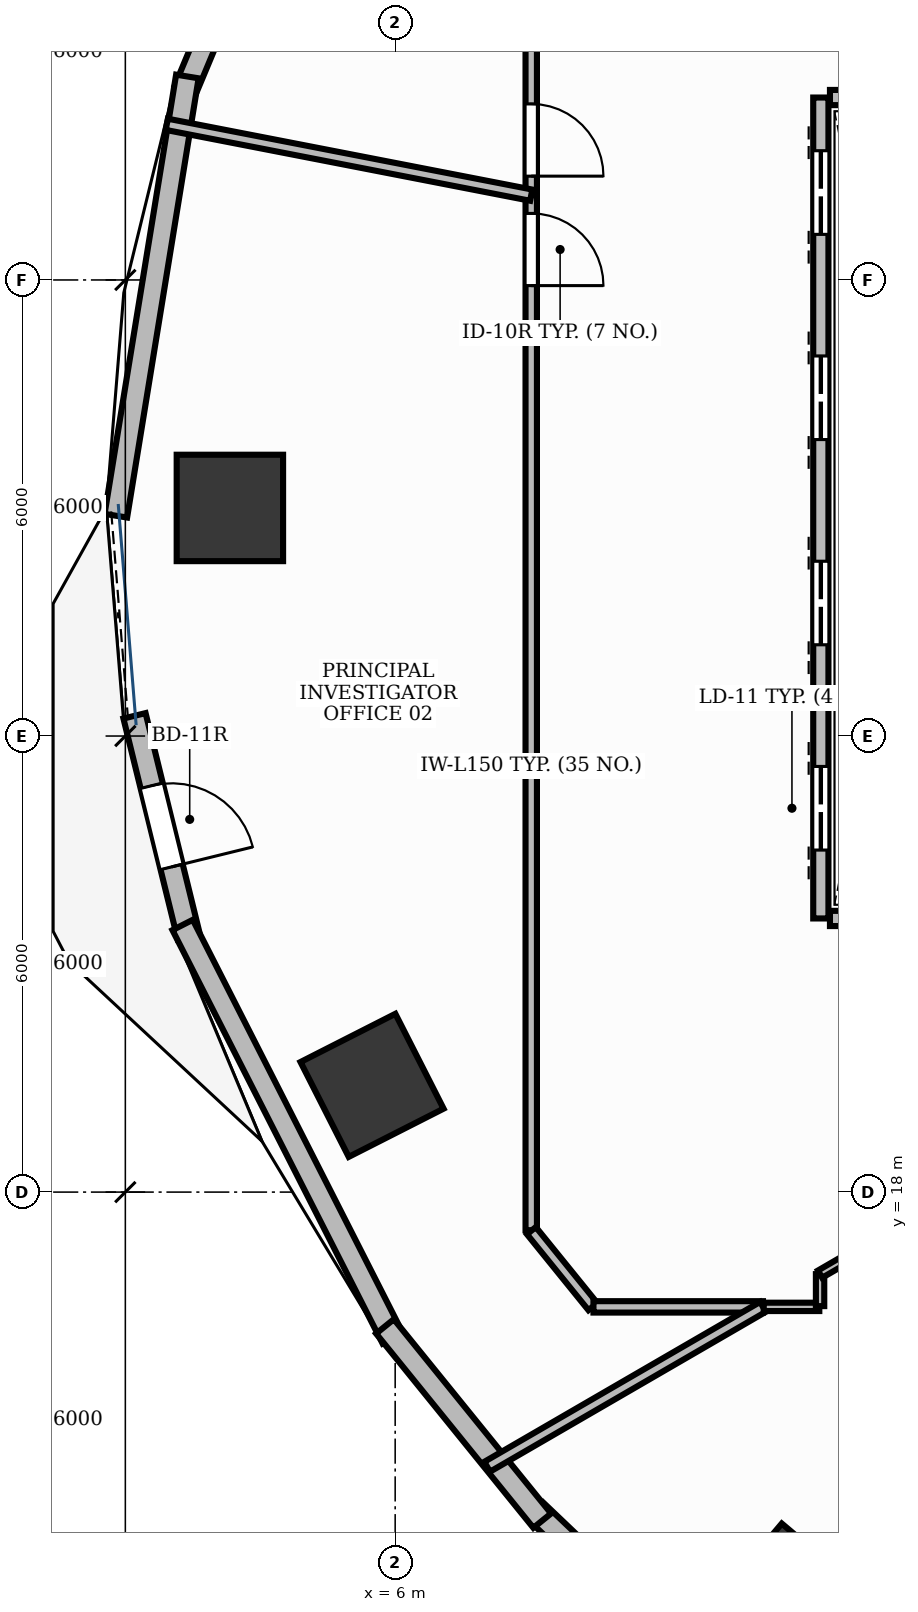
"""IFC4 building model, lengths in metres.
Left out: names, types, materials, properties, quantities, classifications, styles, units other than length and angle.
Written with IfcOpenShell. Run it as: python <this file> out.ifc"""

import sys

from ifc_helpers import new_model, si_unit, direction, frame, frame_2d, origin, origin_2d, place, context, subcontext, project, spatial, rectangle, extrude, element, fill, save


model = new_model("IFC4")
c1 = context("Model", 3, precision=1e-05, world=origin(), true_north=direction((0.0, 1.0)))
c2 = subcontext(c1, "Body", "Model", "MODEL_VIEW")
j1 = project(units=[si_unit("LENGTHUNIT", "METRE"), si_unit("PLANEANGLEUNIT", "RADIAN")], contexts=[c1])
p1 = place(None, origin())
s1 = spatial("IfcSite", under=j1, at=p1, CompositionType="ELEMENT")
p2 = place(p1, origin())
s2 = spatial("IfcBuilding", under=s1, at=p2, CompositionType="ELEMENT")
p3 = place(p2, frame((0.0, 0.0, 72.0)))
s3 = spatial("IfcBuildingStorey", under=s2, at=p3, CompositionType="ELEMENT", Elevation=72.0)
for number, where, z_axis, x_axis in (
    (1, (3.825, 27.001, -0.0), (0.0, 0.0, 1.0), (0.0, 1.0, 0.0)),
    (2, (5.696, 19.404, -0.0), (0.0, 0.0, 1.0), (-0.453, 0.891, 0.0)),
    (3, (11.17, 12.653, -0.0), (0.0, 0.0, 1.0), (-0.764, 0.645, 0.0)),
):
    element("IfcColumn", number, at=place(p3, frame(where, z_axis=z_axis, x_axis=x_axis)), inside=s3, PredefinedType="COLUMN", context=c2, shape_type="SweptSolid", body=[
        extrude(rectangle(XDim=1.4, YDim=1.4, at=origin_2d()), origin(), (0.0, 0.0, 1.0), 3.901),
    ])
p4 = place(p3, frame((4.417, 35.323, 0.0), z_axis=(0.0, 0.0, 1.0), x_axis=(-0.385358473275, -0.92276695166, 0.0)))
e4 = element("IfcWall", 4, at=p4, inside=s3, PredefinedType="STANDARD", context=c2, shape_type="SweptSolid", body=[
    extrude(rectangle(XDim=3.056, YDim=0.3, at=frame_2d((1.528, 0.0))), origin(), (0.0, 0.0, 1.0), 3.47),
])
p5 = place(p4, frame((0.778, 0.0, 0.95)))
e5 = element("IfcOpeningElement", 5, at=p5, cuts=e4, PredefinedType="OPENING", context=c2, shape_type="SweptSolid", body=[
    extrude(rectangle(XDim=1.5, YDim=1.8, at=frame_2d((0.75, 0.9))), frame((0.0, 0.165, 0.0), z_axis=(0.0, -1.0, 0.0), x_axis=(1.0, 0.0, 0.0)), (0.0, 0.0, 1.0), 0.33),
])
p6 = place(p3, frame((2.571, 24.266, 0.0), z_axis=(0.0, 0.0, 1.0), x_axis=(0.238522035896, -0.971137085273, 0.0)))
e6 = element("IfcWall", 6, at=p6, inside=s3, PredefinedType="STANDARD", context=c2, shape_type="SweptSolid", body=[
    extrude(rectangle(XDim=2.993, YDim=0.3, at=frame_2d((1.497, 0.0))), origin(), (0.0, 0.0, 1.0), 3.9),
])
p7 = place(p6, frame((0.946, 0.0, 0.0)))
e7 = element("IfcOpeningElement", 7, at=p7, cuts=e6, PredefinedType="OPENING", context=c2, shape_type="SweptSolid", body=[
    extrude(rectangle(XDim=1.1, YDim=2.15, at=frame_2d((0.55, 1.075))), frame((0.0, 0.165, 0.0), z_axis=(0.0, -1.0, 0.0), x_axis=(1.0, 0.0, 0.0)), (0.0, 0.0, 1.0), 0.33),
])
p8 = place(p3, frame((7.842, 13.809, 0.0), z_axis=(0.0, 0.0, 1.0), x_axis=(0.723678516117, -0.690137236578, 0.0)))
e8 = element("IfcWall", 8, at=p8, inside=s3, PredefinedType="STANDARD", context=c2, shape_type="SweptSolid", body=[
    extrude(rectangle(XDim=3.363, YDim=0.3, at=frame_2d((1.681, 0.0))), origin(), (0.0, 0.0, 1.0), 3.9),
])
p9 = place(p8, frame((0.931, 0.0, 0.95)))
e9 = element("IfcOpeningElement", 9, at=p9, cuts=e8, PredefinedType="OPENING", context=c2, shape_type="SweptSolid", body=[
    extrude(rectangle(XDim=1.5, YDim=1.8, at=frame_2d((0.75, 0.9))), frame((0.0, 0.165, 0.0), z_axis=(0.0, -1.0, 0.0), x_axis=(1.0, 0.0, 0.0)), (0.0, 0.0, 1.0), 0.33),
])
p10 = place(p3, frame((3.266, 32.677, 0.0), z_axis=(0.0, 0.0, 1.0), x_axis=(-0.160712446639, -0.987001271273, 0.0)))
e10 = element("IfcWall", 10, at=p10, inside=s3, PredefinedType="STANDARD", context=c2, shape_type="SweptSolid", body=[
    extrude(rectangle(XDim=5.855, YDim=0.3, at=frame_2d((2.927, 0.0))), origin(), (0.0, 0.0, 1.0), 3.47),
])
p11 = place(p3, frame((3.204, 21.514, 0.0), z_axis=(0.0, 0.0, 1.0), x_axis=(0.453093111502, -0.891463197395, 0.0)))
e11 = element("IfcWall", 11, at=p11, inside=s3, PredefinedType="STANDARD", context=c2, shape_type="SweptSolid", body=[
    extrude(rectangle(XDim=6.102, YDim=0.3, at=frame_2d((3.051, 0.0))), origin(), (0.0, 0.0, 1.0), 3.9),
])
p12 = place(p3, frame((5.866, 16.233, 0.0), z_axis=(0.0, 0.0, 1.0), x_axis=(0.629221727718, -0.777225847079, 0.0)))
e12 = element("IfcWall", 12, at=p12, inside=s3, PredefinedType="STANDARD", context=c2, shape_type="SweptSolid", body=[
    extrude(rectangle(XDim=3.288, YDim=0.3, at=frame_2d((1.644, 0.0))), origin(), (0.0, 0.0, 1.0), 3.9),
])
p13 = place(p3, frame((11.6, 21.6, 0.0), z_axis=(0.0, 0.0, 1.0), x_axis=(0.0, 1.0, 0.0)))
e13 = element("IfcWall", 13, at=p13, inside=s3, PredefinedType="PARTITIONING", context=c2, shape_type="SweptSolid", body=[
    extrude(rectangle(XDim=10.8, YDim=0.2, at=frame_2d((5.4, 0.0))), origin(), (0.0, 0.0, 1.0), 2.91),
])
p14 = place(p13, frame((0.9, 0.0, 0.0)))
e14 = element("IfcOpeningElement", 14, at=p14, cuts=e13, PredefinedType="OPENING", context=c2, shape_type="SweptSolid", body=[
    extrude(rectangle(XDim=1.1, YDim=2.2, at=frame_2d((0.55, 1.1))), frame((0.0, 0.115, 0.0), z_axis=(0.0, -1.0, 0.0), x_axis=(1.0, 0.0, 0.0)), (0.0, 0.0, 1.0), 0.23),
])
p15 = place(p13, frame((3.6, 0.0, 0.0)))
e15 = element("IfcOpeningElement", 15, at=p15, cuts=e13, PredefinedType="OPENING", context=c2, shape_type="SweptSolid", body=[
    extrude(rectangle(XDim=1.1, YDim=2.2, at=frame_2d((0.55, 1.1))), frame((0.0, 0.115, 0.0), z_axis=(0.0, -1.0, 0.0), x_axis=(1.0, 0.0, 0.0)), (0.0, 0.0, 1.0), 0.23),
])
p16 = place(p13, frame((6.3, 0.0, 0.0)))
e16 = element("IfcOpeningElement", 16, at=p16, cuts=e13, PredefinedType="OPENING", context=c2, shape_type="SweptSolid", body=[
    extrude(rectangle(XDim=1.1, YDim=2.2, at=frame_2d((0.55, 1.1))), frame((0.0, 0.115, 0.0), z_axis=(0.0, -1.0, 0.0), x_axis=(1.0, 0.0, 0.0)), (0.0, 0.0, 1.0), 0.23),
])
p17 = place(p13, frame((9.0, 0.0, 0.0)))
e17 = element("IfcOpeningElement", 17, at=p17, cuts=e13, PredefinedType="OPENING", context=c2, shape_type="SweptSolid", body=[
    extrude(rectangle(XDim=1.1, YDim=2.2, at=frame_2d((0.55, 1.1))), frame((0.0, 0.115, 0.0), z_axis=(0.0, -1.0, 0.0), x_axis=(1.0, 0.0, 0.0)), (0.0, 0.0, 1.0), 0.23),
])
for number, where, z_axis, x_axis in (
    (18, (11.72, 21.6, 0.0), (0.0, 0.0, 1.0), (1.0, 0.0, 0.0)),
    (19, (11.72, 32.4, 0.0), (0.0, 0.0, 1.0), (1.0, 0.0, 0.0)),
):
    element("IfcWall", number, at=place(p3, frame(where, z_axis=z_axis, x_axis=x_axis)), inside=s3, PredefinedType="PARTITIONING", context=c2, shape_type="SweptSolid", body=[
        extrude(rectangle(XDim=2.16, YDim=0.2, at=frame_2d((1.08, 0.0))), origin(), (0.0, 0.0, 1.0), 2.91),
    ])
p18 = place(p3, frame((7.79, 31.115, 0.0), z_axis=(0.0, 0.0, 1.0), x_axis=(0.0, -1.0, 0.0)))
e20 = element("IfcWall", 20, at=p18, inside=s3, PredefinedType="PARTITIONING", context=c2, shape_type="SweptSolid", body=[
    extrude(rectangle(XDim=13.617, YDim=0.15, at=frame_2d((6.808, 0.0))), origin(), (0.0, 0.0, 1.0), 2.91),
])
p19 = place(p18, frame((0.24, 0.0, 0.0)))
e21 = element("IfcOpeningElement", 21, at=p19, cuts=e20, PredefinedType="OPENING", context=c2, shape_type="SweptSolid", body=[
    extrude(rectangle(XDim=0.95, YDim=2.15, at=frame_2d((0.475, 1.075))), frame((0.0, 0.09, 0.0), z_axis=(0.0, -1.0, 0.0), x_axis=(1.0, 0.0, 0.0)), (0.0, 0.0, 1.0), 0.18),
])
p20 = place(p3, frame((7.79, 36.501, 0.0), z_axis=(0.0, 0.0, 1.0), x_axis=(0.0, -1.0, 0.0)))
e22 = element("IfcWall", 22, at=p20, inside=s3, PredefinedType="PARTITIONING", context=c2, shape_type="SweptSolid", body=[
    extrude(rectangle(XDim=5.375, YDim=0.15, at=frame_2d((2.688, 0.0))), origin(), (0.0, 0.0, 1.0), 2.91),
])
p21 = place(p20, frame((4.185, 0.0, 0.0)))
e23 = element("IfcOpeningElement", 23, at=p21, cuts=e22, PredefinedType="OPENING", context=c2, shape_type="SweptSolid", body=[
    extrude(rectangle(XDim=0.95, YDim=2.15, at=frame_2d((0.475, 1.075))), frame((0.0, 0.09, 0.0), z_axis=(0.0, -1.0, 0.0), x_axis=(1.0, 0.0, 0.0)), (0.0, 0.0, 1.0), 0.18),
])
p22 = place(p3, frame((2.995, 32.048, 0.0), z_axis=(0.0, 0.0, 1.0), x_axis=(0.981623712682, -0.190826850052, 0.0)))
e24 = element("IfcWall", 24, at=p22, inside=s3, PredefinedType="PARTITIONING", context=c2, shape_type="SweptSolid", body=[
    extrude(rectangle(XDim=4.885, YDim=0.15, at=frame_2d((2.442, 0.0))), origin(), (0.0, 0.0, 1.0), 2.91),
])
p23 = place(p3, frame((7.792, 17.492, 0.0), z_axis=(0.0, 0.0, 1.0), x_axis=(0.629225554682, -0.777222748854, 0.0)))
e25 = element("IfcWall", 25, at=p23, inside=s3, PredefinedType="PARTITIONING", context=c2, shape_type="SweptSolid", body=[
    extrude(rectangle(XDim=1.285, YDim=0.15, at=frame_2d((0.643, 0.0))), origin(), (0.0, 0.0, 1.0), 2.91),
])
p24 = place(p3, frame((8.609, 16.49, 0.0), z_axis=(0.0, 0.0, 1.0), x_axis=(1.0, 0.0, 0.0)))
e26 = element("IfcWall", 26, at=p24, inside=s3, PredefinedType="PARTITIONING", context=c2, shape_type="SweptSolid", body=[
    extrude(rectangle(XDim=2.23, YDim=0.15, at=frame_2d((1.115, 0.0))), origin(), (0.0, 0.0, 1.0), 2.91),
])
p25 = place(p3, frame((10.839, 16.49, 0.0), z_axis=(0.0, 0.0, 1.0), x_axis=(-0.865171113314, -0.501476763856, 0.0)))
e27 = element("IfcWall", 27, at=p25, inside=s3, PredefinedType="PARTITIONING", context=c2, shape_type="SweptSolid", body=[
    extrude(rectangle(XDim=4.194, YDim=0.15, at=frame_2d((2.097, 0.0))), origin(), (0.0, 0.0, 1.0), 2.91),
])
p26 = place(p3, frame((10.849, 16.49, 0.0), z_axis=(0.0, 0.0, 1.0), x_axis=(1.0, 0.0, 0.0)))
e28 = element("IfcWall", 28, at=p26, inside=s3, PredefinedType="MOVABLE", context=c2, shape_type="SweptSolid", body=[
    extrude(rectangle(XDim=0.731, YDim=0.11, at=frame_2d((0.366, 0.0))), origin(), (0.0, 0.0, 1.0), 2.91),
])
p27 = place(p3, frame((11.59, 16.5, 0.0), z_axis=(0.0, 0.0, 1.0), x_axis=(0.0, 1.0, 0.0)))
e29 = element("IfcWall", 29, at=p27, inside=s3, PredefinedType="MOVABLE", context=c2, shape_type="SweptSolid", body=[
    extrude(rectangle(XDim=0.421, YDim=0.11, at=frame_2d((0.21, 0.0))), origin(), (0.0, 0.0, 1.0), 2.91),
])
p28 = place(p3, frame((11.59, 16.921, 0.0), z_axis=(0.0, 0.0, 1.0), x_axis=(0.865161287927, 0.50149371469, 0.0)))
e30 = element("IfcWall", 30, at=p28, inside=s3, PredefinedType="MOVABLE", context=c2, shape_type="SweptSolid", body=[
    extrude(rectangle(XDim=3.029, YDim=0.11, at=frame_2d((1.515, 0.0))), origin(), (0.0, 0.0, 1.0), 2.91),
])
p29 = place(p7, origin())
e31 = element("IfcDoor", 31, at=p29, inside=s3, OperationType="SINGLE_SWING_RIGHT", PredefinedType="DOOR", context=c2, shape_type="SweptSolid", body=[
    extrude(rectangle(XDim=1.1, YDim=2.15, at=frame_2d((0.55, 1.075))), frame((0.0, 0.025, 0.0), z_axis=(0.0, -1.0, 0.0), x_axis=(1.0, 0.0, 0.0)), (0.0, 0.0, 1.0), 0.05),
])
fill(e7, e31)
p30 = place(p14, origin())
e32 = element("IfcDoor", 32, at=p30, inside=s3, OperationType="DOUBLE_DOOR_SLIDING", PredefinedType="DOOR", context=c2, shape_type="SweptSolid", body=[
    extrude(rectangle(XDim=1.1, YDim=2.2, at=frame_2d((0.55, 1.1))), frame((0.0, 0.025, 0.0), z_axis=(0.0, -1.0, 0.0), x_axis=(1.0, 0.0, 0.0)), (0.0, 0.0, 1.0), 0.05),
])
fill(e14, e32)
p31 = place(p15, origin())
e33 = element("IfcDoor", 33, at=p31, inside=s3, OperationType="DOUBLE_DOOR_SLIDING", PredefinedType="DOOR", context=c2, shape_type="SweptSolid", body=[
    extrude(rectangle(XDim=1.1, YDim=2.2, at=frame_2d((0.55, 1.1))), frame((0.0, 0.025, 0.0), z_axis=(0.0, -1.0, 0.0), x_axis=(1.0, 0.0, 0.0)), (0.0, 0.0, 1.0), 0.05),
])
fill(e15, e33)
p32 = place(p16, origin())
e34 = element("IfcDoor", 34, at=p32, inside=s3, OperationType="DOUBLE_DOOR_SLIDING", PredefinedType="DOOR", context=c2, shape_type="SweptSolid", body=[
    extrude(rectangle(XDim=1.1, YDim=2.2, at=frame_2d((0.55, 1.1))), frame((0.0, 0.025, 0.0), z_axis=(0.0, -1.0, 0.0), x_axis=(1.0, 0.0, 0.0)), (0.0, 0.0, 1.0), 0.05),
])
fill(e16, e34)
p33 = place(p17, origin())
e35 = element("IfcDoor", 35, at=p33, inside=s3, OperationType="DOUBLE_DOOR_SLIDING", PredefinedType="DOOR", context=c2, shape_type="SweptSolid", body=[
    extrude(rectangle(XDim=1.1, YDim=2.2, at=frame_2d((0.55, 1.1))), frame((0.0, 0.025, 0.0), z_axis=(0.0, -1.0, 0.0), x_axis=(1.0, 0.0, 0.0)), (0.0, 0.0, 1.0), 0.05),
])
fill(e17, e35)
p34 = place(p19, origin())
e36 = element("IfcDoor", 36, at=p34, inside=s3, OperationType="SINGLE_SWING_RIGHT", PredefinedType="DOOR", context=c2, shape_type="SweptSolid", body=[
    extrude(rectangle(XDim=0.95, YDim=2.15, at=frame_2d((0.475, 1.075))), frame((0.0, 0.025, 0.0), z_axis=(0.0, -1.0, 0.0), x_axis=(1.0, 0.0, 0.0)), (0.0, 0.0, 1.0), 0.05),
])
fill(e21, e36)
p35 = place(p21, origin())
e37 = element("IfcDoor", 37, at=p35, inside=s3, OperationType="SINGLE_SWING_RIGHT", PredefinedType="DOOR", context=c2, shape_type="SweptSolid", body=[
    extrude(rectangle(XDim=0.95, YDim=2.15, at=frame_2d((0.475, 1.075))), frame((0.0, 0.025, 0.0), z_axis=(0.0, -1.0, 0.0), x_axis=(1.0, 0.0, 0.0)), (0.0, 0.0, 1.0), 0.05),
])
fill(e23, e37)
save(model, sys.argv[1])
